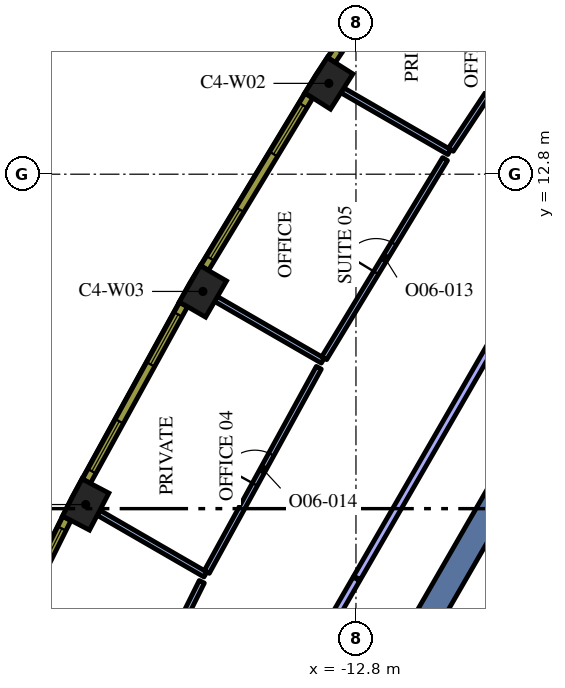
"""IFC4 building model, lengths in metres.
Left out: names, types, materials, properties, quantities, classifications, styles, units other than length and angle.
Written with IfcOpenShell. Run it as: python <this file> out.ifc"""

import sys

from ifc_helpers import new_model, si_unit, direction, frame, frame_2d, origin, origin_2d, place, context, subcontext, project, spatial, rectangle, extrude, element, fill, save


model = new_model("IFC4")
c1 = context("Model", 3, precision=1e-05, world=origin(), true_north=direction((0.0, 1.0)))
c2 = subcontext(c1, "Body", "Model", "MODEL_VIEW")
j1 = project(units=[si_unit("LENGTHUNIT", "METRE"), si_unit("PLANEANGLEUNIT", "RADIAN")], contexts=[c1])
p1 = place(None, origin())
s1 = spatial("IfcSite", under=j1, at=p1, CompositionType="ELEMENT")
p2 = place(p1, origin())
s2 = spatial("IfcBuilding", under=s1, at=p2, CompositionType="ELEMENT")
p3 = place(p2, frame((0.0, 0.0, 210.0)))
s3 = spatial("IfcBuildingStorey", under=s2, at=p3, CompositionType="ELEMENT", Elevation=210.0)
for number, where, z_axis, x_axis in (
    (1, (-13.513, 15.19, 0.0), (0.0, 0.0, 1.0), (-0.536, -0.845, 0.0)),
    (2, (-16.827, 9.715, 0.0), (0.0, 0.0, 1.0), (-0.5, -0.866, 0.0)),
    (3, (-19.912, 4.108, 0.0), (0.0, 0.0, 1.0), (-0.464, -0.886, 0.0)),
):
    element("IfcColumn", number, at=place(p3, frame(where, z_axis=z_axis, x_axis=x_axis)), inside=s3, PredefinedType="COLUMN", context=c2, shape_type="SweptSolid", body=[
        extrude(rectangle(XDim=1.1, YDim=0.8, at=origin_2d()), origin(), (0.0, 0.0, 1.0), 4.2),
    ])
p4 = place(p3, frame((-4.696, 11.867, 0.0), z_axis=(0.0, 0.0, 1.0), x_axis=(-0.500003726532, -0.866023252259, 0.0)))
e4 = element("IfcWall", 4, at=p4, inside=s3, PredefinedType="SOLIDWALL", context=c2, shape_type="SweptSolid", body=[
    extrude(rectangle(XDim=12.848, YDim=0.7, at=frame_2d((6.424, 0.0))), origin(), (0.0, 0.0, 1.0), 4.2),
])
p5 = place(p3, frame((-10.344, 13.382, 0.0), z_axis=(0.0, 0.0, 1.0), x_axis=(-0.865990253757, 0.500060876692, 0.0)))
e5 = element("IfcWall", 5, at=p5, inside=s3, PredefinedType="PARTITIONING", context=c2, shape_type="SweptSolid", body=[
    extrude(rectangle(XDim=3.247, YDim=0.15, at=frame_2d((1.624, 0.0))), origin(), (0.0, 0.0, 1.0), 3.45),
])
p6 = place(p3, frame((-10.303, 13.445, 0.0), z_axis=(0.0, 0.0, 1.0), x_axis=(0.552908115949, 0.833242230878, 0.0)))
e6 = element("IfcWall", 6, at=p6, inside=s3, PredefinedType="PARTITIONING", context=c2, shape_type="SweptSolid", body=[
    extrude(rectangle(XDim=5.789, YDim=0.15, at=frame_2d((2.895, 0.0))), origin(), (0.0, 0.0, 1.0), 3.45),
])
p7 = place(p6, frame((2.489, 0.0, 0.0)))
e7 = element("IfcOpeningElement", 7, at=p7, cuts=e6, PredefinedType="OPENING", context=c2, shape_type="SweptSolid", body=[
    extrude(rectangle(XDim=0.9, YDim=2.1, at=frame_2d((0.45, 1.05))), frame((0.0, 0.085, 0.0), z_axis=(0.0, -1.0, 0.0), x_axis=(1.0, 0.0, 0.0)), (0.0, 0.0, 1.0), 0.17),
])
p8 = place(p3, frame((-13.674, 7.895, 0.0), z_axis=(0.0, 0.0, 1.0), x_axis=(-0.866032537582, 0.499987643696, 0.0)))
e8 = element("IfcWall", 8, at=p8, inside=s3, PredefinedType="PARTITIONING", context=c2, shape_type="SweptSolid", body=[
    extrude(rectangle(XDim=3.241, YDim=0.15, at=frame_2d((1.62, 0.0))), origin(), (0.0, 0.0, 1.0), 3.45),
])
p9 = place(p3, frame((-13.635, 7.959, 0.0), z_axis=(0.0, 0.0, 1.0), x_axis=(0.518788941184, 0.854902353784, 0.0)))
e9 = element("IfcWall", 9, at=p9, inside=s3, PredefinedType="PARTITIONING", context=c2, shape_type="SweptSolid", body=[
    extrude(rectangle(XDim=6.129, YDim=0.15, at=frame_2d((3.064, 0.0))), origin(), (0.0, 0.0, 1.0), 3.45),
])
p10 = place(p9, frame((2.629, 0.0, 0.0)))
e10 = element("IfcOpeningElement", 10, at=p10, cuts=e9, PredefinedType="OPENING", context=c2, shape_type="SweptSolid", body=[
    extrude(rectangle(XDim=0.9, YDim=2.1, at=frame_2d((0.45, 1.05))), frame((0.0, 0.085, 0.0), z_axis=(0.0, -1.0, 0.0), x_axis=(1.0, 0.0, 0.0)), (0.0, 0.0, 1.0), 0.17),
])
p11 = place(p3, frame((-16.761, 2.268, 0.0), z_axis=(0.0, 0.0, 1.0), x_axis=(-0.866022812202, 0.500004488726, 0.0)))
e11 = element("IfcWall", 11, at=p11, inside=s3, PredefinedType="PARTITIONING", context=c2, shape_type="SweptSolid", body=[
    extrude(rectangle(XDim=3.247, YDim=0.15, at=frame_2d((1.624, 0.0))), origin(), (0.0, 0.0, 1.0), 3.45),
])
p12 = place(p3, frame((-16.725, 2.333, 0.0), z_axis=(0.0, 0.0, 1.0), x_axis=(0.480955103875, 0.876745224142, 0.0)))
e12 = element("IfcWall", 12, at=p12, inside=s3, PredefinedType="PARTITIONING", context=c2, shape_type="SweptSolid", body=[
    extrude(rectangle(XDim=6.129, YDim=0.15, at=frame_2d((3.064, 0.0))), origin(), (0.0, 0.0, 1.0), 3.45),
])
p13 = place(p12, frame((2.629, 0.0, 0.0)))
e13 = element("IfcOpeningElement", 13, at=p13, cuts=e12, PredefinedType="OPENING", context=c2, shape_type="SweptSolid", body=[
    extrude(rectangle(XDim=0.9, YDim=2.1, at=frame_2d((0.45, 1.05))), frame((0.0, 0.085, 0.0), z_axis=(0.0, -1.0, 0.0), x_axis=(1.0, 0.0, 0.0)), (0.0, 0.0, 1.0), 0.17),
])
p14 = place(p3, frame((-19.467, -3.175, 0.0), z_axis=(0.0, 0.0, 1.0), x_axis=(0.445180755526, 0.895440726631, 0.0)))
e14 = element("IfcWall", 14, at=p14, inside=s3, PredefinedType="PARTITIONING", context=c2, shape_type="SweptSolid", body=[
    extrude(rectangle(XDim=5.864, YDim=0.15, at=frame_2d((2.932, 0.0))), origin(), (0.0, 0.0, 1.0), 3.45),
])
p15 = place(p14, frame((2.464, 0.0, 0.0)))
e15 = element("IfcOpeningElement", 15, at=p15, cuts=e14, PredefinedType="OPENING", context=c2, shape_type="SweptSolid", body=[
    extrude(rectangle(XDim=0.9, YDim=2.1, at=frame_2d((0.45, 1.05))), frame((0.0, 0.085, 0.0), z_axis=(0.0, -1.0, 0.0), x_axis=(1.0, 0.0, 0.0)), (0.0, 0.0, 1.0), 0.17),
])
p16 = place(p3, frame((-8.272, 9.972, 0.0), z_axis=(0.0, 0.0, 1.0), x_axis=(-0.5000018851, -0.866024315419, 0.0)))
e16 = element("IfcWall", 16, at=p16, inside=s3, PredefinedType="PARTITIONING", context=c2, shape_type="SweptSolid", body=[
    extrude(rectangle(XDim=9.0, YDim=0.2, at=frame_2d((4.5, 0.0))), origin(), (0.0, 0.0, 1.0), 3.45),
])
p17 = place(p3, frame((-12.787, 2.152, 0.0), z_axis=(0.0, 0.0, 1.0), x_axis=(-0.50000660679, -0.866021589319, 0.0)))
e17 = element("IfcWall", 17, at=p17, inside=s3, PredefinedType="PARTITIONING", context=c2, shape_type="SweptSolid", body=[
    extrude(rectangle(XDim=9.817, YDim=0.2, at=frame_2d((4.909, 0.0))), origin(), (0.0, 0.0, 1.0), 3.45),
])
p18 = place(p17, frame((4.4, 0.0, 0.0)))
e18 = element("IfcOpeningElement", 18, at=p18, cuts=e17, PredefinedType="OPENING", context=c2, shape_type="SweptSolid", body=[
    extrude(rectangle(XDim=1.0, YDim=2.1, at=frame_2d((0.5, 1.05))), frame((0.0, 0.11, 0.0), z_axis=(0.0, -1.0, 0.0), x_axis=(1.0, 0.0, 0.0)), (0.0, 0.0, 1.0), 0.22),
])
p19 = place(p3, frame((-10.513, 20.218, 0.0), z_axis=(0.0, 0.0, 1.0), x_axis=(-0.552901821755, -0.833246407433, 0.0)))
e19 = element("IfcWall", 19, at=p19, inside=s3, PredefinedType="SOLIDWALL", context=c2, shape_type="SweptSolid", body=[
    extrude(rectangle(XDim=5.298, YDim=0.24, at=frame_2d((2.649, 0.0))), origin(), (0.0, 0.0, 1.0), 3.95),
])
p20 = place(p19, frame((0.294, 0.0, 0.9)))
e20 = element("IfcOpeningElement", 20, at=p20, cuts=e19, PredefinedType="OPENING", context=c2, shape_type="SweptSolid", body=[
    extrude(rectangle(XDim=1.5, YDim=2.55, at=frame_2d((0.75, 1.275))), frame((0.0, 0.13, 0.0), z_axis=(0.0, -1.0, 0.0), x_axis=(1.0, 0.0, 0.0)), (0.0, 0.0, 1.0), 0.26),
])
p21 = place(p19, frame((3.504, 0.0, 0.9)))
e21 = element("IfcOpeningElement", 21, at=p21, cuts=e19, PredefinedType="OPENING", context=c2, shape_type="SweptSolid", body=[
    extrude(rectangle(XDim=1.5, YDim=2.55, at=frame_2d((0.75, 1.275))), frame((0.0, 0.13, 0.0), z_axis=(0.0, -1.0, 0.0), x_axis=(1.0, 0.0, 0.0)), (0.0, 0.0, 1.0), 0.26),
])
p22 = place(p3, frame((-14.038, 14.864, 0.0), z_axis=(0.0, 0.0, 1.0), x_axis=(-0.517846166225, -0.855473756538, 0.0)))
e22 = element("IfcWall", 22, at=p22, inside=s3, PredefinedType="SOLIDWALL", context=c2, shape_type="SweptSolid", body=[
    extrude(rectangle(XDim=5.298, YDim=0.24, at=frame_2d((2.649, 0.0))), origin(), (0.0, 0.0, 1.0), 3.95),
])
p23 = place(p22, frame((0.294, 0.0, 0.9)))
e23 = element("IfcOpeningElement", 23, at=p23, cuts=e22, PredefinedType="OPENING", context=c2, shape_type="SweptSolid", body=[
    extrude(rectangle(XDim=1.5, YDim=2.55, at=frame_2d((0.75, 1.275))), frame((0.0, 0.13, 0.0), z_axis=(0.0, -1.0, 0.0), x_axis=(1.0, 0.0, 0.0)), (0.0, 0.0, 1.0), 0.26),
])
p24 = place(p22, frame((3.504, 0.0, 0.9)))
e24 = element("IfcOpeningElement", 24, at=p24, cuts=e22, PredefinedType="OPENING", context=c2, shape_type="SweptSolid", body=[
    extrude(rectangle(XDim=1.5, YDim=2.55, at=frame_2d((0.75, 1.275))), frame((0.0, 0.13, 0.0), z_axis=(0.0, -1.0, 0.0), x_axis=(1.0, 0.0, 0.0)), (0.0, 0.0, 1.0), 0.26),
])
p25 = place(p3, frame((-17.338, 9.368, 0.0), z_axis=(0.0, 0.0, 1.0), x_axis=(-0.481925825015, -0.876212017256, 0.0)))
e25 = element("IfcWall", 25, at=p25, inside=s3, PredefinedType="SOLIDWALL", context=c2, shape_type="SweptSolid", body=[
    extrude(rectangle(XDim=5.299, YDim=0.24, at=frame_2d((2.649, 0.0))), origin(), (0.0, 0.0, 1.0), 3.95),
])
p26 = place(p25, frame((0.295, 0.0, 0.9)))
e26 = element("IfcOpeningElement", 26, at=p26, cuts=e25, PredefinedType="OPENING", context=c2, shape_type="SweptSolid", body=[
    extrude(rectangle(XDim=1.5, YDim=2.55, at=frame_2d((0.75, 1.275))), frame((0.0, 0.13, 0.0), z_axis=(0.0, -1.0, 0.0), x_axis=(1.0, 0.0, 0.0)), (0.0, 0.0, 1.0), 0.26),
])
p27 = place(p25, frame((3.504, 0.0, 0.9)))
e27 = element("IfcOpeningElement", 27, at=p27, cuts=e25, PredefinedType="OPENING", context=c2, shape_type="SweptSolid", body=[
    extrude(rectangle(XDim=1.5, YDim=2.55, at=frame_2d((0.75, 1.275))), frame((0.0, 0.13, 0.0), z_axis=(0.0, -1.0, 0.0), x_axis=(1.0, 0.0, 0.0)), (0.0, 0.0, 1.0), 0.26),
])
p28 = place(p3, frame((-20.407, 3.74, 0.0), z_axis=(0.0, 0.0, 1.0), x_axis=(-0.445129582031, -0.895466166419, 0.0)))
e28 = element("IfcWall", 28, at=p28, inside=s3, PredefinedType="SOLIDWALL", context=c2, shape_type="SweptSolid", body=[
    extrude(rectangle(XDim=5.298, YDim=0.24, at=frame_2d((2.649, 0.0))), origin(), (0.0, 0.0, 1.0), 3.95),
])
p29 = place(p28, frame((0.295, 0.0, 0.9)))
e29 = element("IfcOpeningElement", 29, at=p29, cuts=e28, PredefinedType="OPENING", context=c2, shape_type="SweptSolid", body=[
    extrude(rectangle(XDim=1.5, YDim=2.55, at=frame_2d((0.75, 1.275))), frame((0.0, 0.13, 0.0), z_axis=(0.0, -1.0, 0.0), x_axis=(1.0, 0.0, 0.0)), (0.0, 0.0, 1.0), 0.26),
])
p30 = place(p28, frame((3.504, 0.0, 0.9)))
e30 = element("IfcOpeningElement", 30, at=p30, cuts=e28, PredefinedType="OPENING", context=c2, shape_type="SweptSolid", body=[
    extrude(rectangle(XDim=1.5, YDim=2.55, at=frame_2d((0.75, 1.275))), frame((0.0, 0.13, 0.0), z_axis=(0.0, -1.0, 0.0), x_axis=(1.0, 0.0, 0.0)), (0.0, 0.0, 1.0), 0.26),
])
p31 = place(p10, origin())
e31 = element("IfcDoor", 31, at=p31, inside=s3, OperationType="SINGLE_SWING_RIGHT", PredefinedType="DOOR", context=c2, shape_type="SweptSolid", body=[
    extrude(rectangle(XDim=0.9, YDim=2.1, at=frame_2d((0.45, 1.05))), frame((0.0, 0.025, 0.0), z_axis=(0.0, -1.0, 0.0), x_axis=(1.0, 0.0, 0.0)), (0.0, 0.0, 1.0), 0.05),
])
fill(e10, e31)
p32 = place(p13, origin())
e32 = element("IfcDoor", 32, at=p32, inside=s3, OperationType="SINGLE_SWING_RIGHT", PredefinedType="DOOR", context=c2, shape_type="SweptSolid", body=[
    extrude(rectangle(XDim=0.9, YDim=2.1, at=frame_2d((0.45, 1.05))), frame((0.0, 0.025, 0.0), z_axis=(0.0, -1.0, 0.0), x_axis=(1.0, 0.0, 0.0)), (0.0, 0.0, 1.0), 0.05),
])
fill(e13, e32)
p33 = place(p23, origin())
e33 = element("IfcWindow", 33, at=p33, inside=s3, PartitioningType="SINGLE_PANEL", PredefinedType="WINDOW", context=c2, shape_type="SweptSolid", body=[
    extrude(rectangle(XDim=1.5, YDim=2.55, at=frame_2d((0.75, 1.275))), frame((0.0, 0.04, 0.0), z_axis=(0.0, -1.0, 0.0), x_axis=(1.0, 0.0, 0.0)), (0.0, 0.0, 1.0), 0.06),
])
fill(e23, e33)
p34 = place(p24, origin())
e34 = element("IfcWindow", 34, at=p34, inside=s3, PartitioningType="SINGLE_PANEL", PredefinedType="WINDOW", context=c2, shape_type="SweptSolid", body=[
    extrude(rectangle(XDim=1.5, YDim=2.55, at=frame_2d((0.75, 1.275))), frame((0.0, 0.04, 0.0), z_axis=(0.0, -1.0, 0.0), x_axis=(1.0, 0.0, 0.0)), (0.0, 0.0, 1.0), 0.06),
])
fill(e24, e34)
p35 = place(p26, origin())
e35 = element("IfcWindow", 35, at=p35, inside=s3, PartitioningType="SINGLE_PANEL", PredefinedType="WINDOW", context=c2, shape_type="SweptSolid", body=[
    extrude(rectangle(XDim=1.5, YDim=2.55, at=frame_2d((0.75, 1.275))), frame((0.0, 0.04, 0.0), z_axis=(0.0, -1.0, 0.0), x_axis=(1.0, 0.0, 0.0)), (0.0, 0.0, 1.0), 0.06),
])
fill(e26, e35)
p36 = place(p27, origin())
e36 = element("IfcWindow", 36, at=p36, inside=s3, PartitioningType="SINGLE_PANEL", PredefinedType="WINDOW", context=c2, shape_type="SweptSolid", body=[
    extrude(rectangle(XDim=1.5, YDim=2.55, at=frame_2d((0.75, 1.275))), frame((0.0, 0.04, 0.0), z_axis=(0.0, -1.0, 0.0), x_axis=(1.0, 0.0, 0.0)), (0.0, 0.0, 1.0), 0.06),
])
fill(e27, e36)
p37 = place(p29, origin())
e37 = element("IfcWindow", 37, at=p37, inside=s3, PartitioningType="SINGLE_PANEL", PredefinedType="WINDOW", context=c2, shape_type="SweptSolid", body=[
    extrude(rectangle(XDim=1.5, YDim=2.55, at=frame_2d((0.75, 1.275))), frame((0.0, 0.04, 0.0), z_axis=(0.0, -1.0, 0.0), x_axis=(1.0, 0.0, 0.0)), (0.0, 0.0, 1.0), 0.06),
])
fill(e29, e37)
save(model, sys.argv[1])
